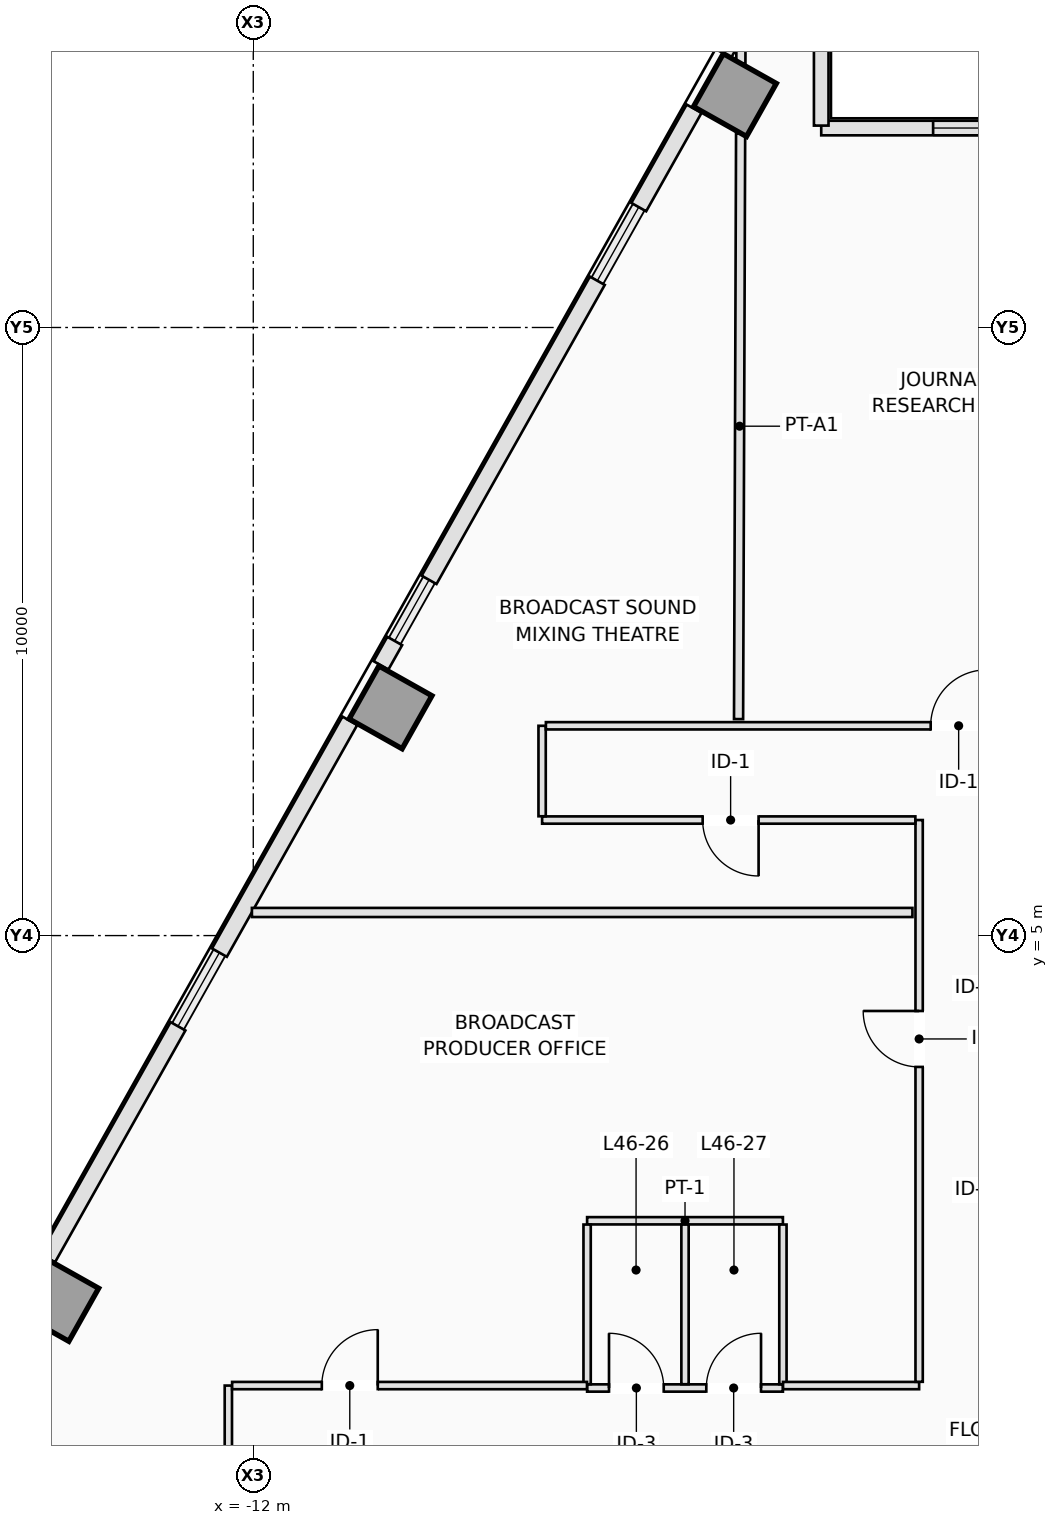
"""IFC4 building model, lengths in metres.
Left out: names, types, materials, properties, quantities, classifications, styles, units other than length and angle.
Written with IfcOpenShell. Run it as: python <this file> out.ifc"""

import sys

from ifc_helpers import new_model, si_unit, direction, frame, frame_2d, origin, origin_2d, place, context, subcontext, project, spatial, rectangle, extrude, element, fill, save


model = new_model("IFC4")
c1 = context("Model", 3, precision=1e-05, world=origin(), true_north=direction((0.0, 1.0)))
c2 = subcontext(c1, "Body", "Model", "MODEL_VIEW")
j1 = project(units=[si_unit("LENGTHUNIT", "METRE"), si_unit("PLANEANGLEUNIT", "RADIAN")], contexts=[c1])
p1 = place(None, origin())
s1 = spatial("IfcSite", under=j1, at=p1, CompositionType="ELEMENT")
p2 = place(p1, origin())
s2 = spatial("IfcBuilding", under=s1, at=p2, CompositionType="ELEMENT")
p3 = place(p2, frame((0.0, 0.0, 168.5)))
s3 = spatial("IfcBuildingStorey", under=s2, at=p3, CompositionType="ELEMENT", Elevation=168.5)
for number, where, z_axis, x_axis in (
    (1, (-4.079, 18.822, 0.0), (0.0, 0.0, 1.0), (-0.872, 0.49, 0.0)),
    (2, (-9.743, 8.753, 0.0), (0.0, 0.0, 1.0), (-0.872, 0.49, 0.0)),
    (3, (-15.224, -0.991, 0.0), (0.0, 0.0, 1.0), (-0.872, 0.49, 0.0)),
):
    element("IfcColumn", number, at=place(p3, frame(where, z_axis=z_axis, x_axis=x_axis)), inside=s3, PredefinedType="COLUMN", context=c2, shape_type="SweptSolid", body=[
        extrude(rectangle(XDim=1.0, YDim=1.0, at=origin_2d()), origin(), (0.0, 0.0, 1.0), 3.5),
    ])
p4 = place(p3, frame((-4.246, 19.495, 0.0), z_axis=(0.0, 0.0, 1.0), x_axis=(0.490048346303, 0.871695255399, 0.0)))
e4 = element("IfcWall", 4, at=p4, inside=s3, PredefinedType="STANDARD", context=c2, shape_type="SweptSolid", body=[
    extrude(rectangle(XDim=0.926, YDim=0.24, at=frame_2d((0.463, 0.0))), origin(), (0.0, 0.0, 1.0), 3.25),
])
p5 = place(p3, frame((-9.9, 9.444, 0.0), z_axis=(0.0, 0.0, 1.0), x_axis=(0.490412424957, 0.871490478116, 0.0)))
e5 = element("IfcWall", 5, at=p5, inside=s3, PredefinedType="STANDARD", context=c2, shape_type="SweptSolid", body=[
    extrude(rectangle(XDim=0.46, YDim=0.28, at=frame_2d((0.23, 0.0))), origin(), (0.0, 0.0, 1.0), 3.25),
])
p6 = place(p3, frame((-9.109, 10.85, 0.0), z_axis=(0.0, 0.0, 1.0), x_axis=(0.490289995219, 0.871559361483, 0.0)))
e6 = element("IfcWall", 6, at=p6, inside=s3, PredefinedType="STANDARD", context=c2, shape_type="SweptSolid", body=[
    extrude(rectangle(XDim=5.643, YDim=0.28, at=frame_2d((2.822, 0.0))), origin(), (0.0, 0.0, 1.0), 3.25),
])
p7 = place(p3, frame((-5.661, 16.98, 0.0), z_axis=(0.0, 0.0, 1.0), x_axis=(0.490248749158, 0.871582562899, 0.0)))
e7 = element("IfcWall", 7, at=p7, inside=s3, PredefinedType="STANDARD", context=c2, shape_type="SweptSolid", body=[
    extrude(rectangle(XDim=1.856, YDim=0.28, at=frame_2d((0.928, 0.0))), origin(), (0.0, 0.0, 1.0), 3.25),
])
p8 = place(p3, frame((-15.383, -0.305, 0.0), z_axis=(0.0, 0.0, 1.0), x_axis=(0.490232095789, 0.871591929895, 0.0)))
e8 = element("IfcWall", 8, at=p8, inside=s3, PredefinedType="STANDARD", context=c2, shape_type="SweptSolid", body=[
    extrude(rectangle(XDim=4.375, YDim=0.28, at=frame_2d((2.188, 0.0))), origin(), (0.0, 0.0, 1.0), 3.25),
])
p9 = place(p3, frame((-12.557, 4.72, 0.0), z_axis=(0.0, 0.0, 1.0), x_axis=(0.490274486291, 0.871568085747, 0.0)))
e9 = element("IfcWall", 9, at=p9, inside=s3, PredefinedType="STANDARD", context=c2, shape_type="SweptSolid", body=[
    extrude(rectangle(XDim=4.375, YDim=0.28, at=frame_2d((2.188, 0.0))), origin(), (0.0, 0.0, 1.0), 3.25),
])
p10 = place(p3, frame((2.62, 18.28, 0.0), z_axis=(0.0, 0.0, 1.0), x_axis=(-1.0, 0.0, 0.0)))
e10 = element("IfcWall", 10, at=p10, inside=s3, PredefinedType="STANDARD", context=c2, shape_type="SweptSolid", body=[
    extrude(rectangle(XDim=5.28, YDim=0.24, at=frame_2d((2.64, 0.0))), origin(), (0.0, 0.0, 1.0), 3.25),
])
p11 = place(p10, frame((1.84, 0.0, 0.9)))
e11 = element("IfcOpeningElement", 11, at=p11, cuts=e10, PredefinedType="OPENING", context=c2, shape_type="SweptSolid", body=[
    extrude(rectangle(XDim=1.6, YDim=2.1, at=frame_2d((0.8, 1.05))), frame((0.0, 0.13, 0.0), z_axis=(0.0, -1.0, 0.0), x_axis=(1.0, 0.0, 0.0)), (0.0, 0.0, 1.0), 0.26),
])
p12 = place(p3, frame((-2.66, 18.32, 0.0), z_axis=(0.0, 0.0, 1.0), x_axis=(0.0, 1.0, 0.0)))
e12 = element("IfcWall", 12, at=p12, inside=s3, PredefinedType="STANDARD", context=c2, shape_type="SweptSolid", body=[
    extrude(rectangle(XDim=1.96, YDim=0.24, at=frame_2d((0.98, 0.0))), origin(), (0.0, 0.0, 1.0), 3.25),
])
p13 = place(p3, frame((-6.51, -2.44, 0.0), z_axis=(0.0, 0.0, 1.0), x_axis=(1.0, 0.0, 0.0)))
e13 = element("IfcWall", 13, at=p13, inside=s3, PredefinedType="PARTITIONING", context=c2, shape_type="SweptSolid", body=[
    extrude(rectangle(XDim=3.22, YDim=0.12, at=frame_2d((1.61, 0.0))), origin(), (0.0, 0.0, 1.0), 2.891),
])
p14 = place(p13, frame((0.36, 0.0, 0.0)))
e14 = element("IfcOpeningElement", 14, at=p14, cuts=e13, PredefinedType="OPENING", context=c2, shape_type="SweptSolid", body=[
    extrude(rectangle(XDim=0.9, YDim=2.12, at=frame_2d((0.45, 1.06))), frame((0.0, 0.07, 0.0), z_axis=(0.0, -1.0, 0.0), x_axis=(1.0, 0.0, 0.0)), (0.0, 0.0, 1.0), 0.14),
])
p15 = place(p13, frame((1.96, 0.0, 0.0)))
e15 = element("IfcOpeningElement", 15, at=p15, cuts=e13, PredefinedType="OPENING", context=c2, shape_type="SweptSolid", body=[
    extrude(rectangle(XDim=0.9, YDim=2.12, at=frame_2d((0.45, 1.06))), frame((0.0, 0.07, 0.0), z_axis=(0.0, -1.0, 0.0), x_axis=(1.0, 0.0, 0.0)), (0.0, 0.0, 1.0), 0.14),
])
p16 = place(p3, frame((-6.51, 0.31, 0.0), z_axis=(0.0, 0.0, 1.0), x_axis=(1.0, 0.0, 0.0)))
e16 = element("IfcWall", 16, at=p16, inside=s3, PredefinedType="PARTITIONING", context=c2, shape_type="SweptSolid", body=[
    extrude(rectangle(XDim=3.22, YDim=0.12, at=frame_2d((1.61, 0.0))), origin(), (0.0, 0.0, 1.0), 3.25),
])
for number, where, z_axis, x_axis in (
    (17, (-6.51, -2.378, 0.0), (0.0, 0.0, 1.0), (0.0, 1.0, 0.0)),
    (18, (-4.9, -2.378, 0.0), (0.0, 0.0, 1.0), (0.0, 1.0, 0.0)),
    (19, (-3.29, -2.378, 0.0), (0.0, 0.0, 1.0), (0.0, 1.0, 0.0)),
):
    element("IfcWall", number, at=place(p3, frame(where, z_axis=z_axis, x_axis=x_axis)), inside=s3, PredefinedType="PARTITIONING", context=c2, shape_type="SweptSolid", body=[
        extrude(rectangle(XDim=2.626, YDim=0.12, at=frame_2d((1.313, 0.0))), origin(), (0.0, 0.0, 1.0), 3.25),
    ])
p17 = place(p3, frame((-12.41, -4.248, 0.0), z_axis=(0.0, 0.0, 1.0), x_axis=(0.0, 1.0, 0.0)))
e20 = element("IfcWall", 20, at=p17, inside=s3, PredefinedType="PARTITIONING", context=c2, shape_type="SweptSolid", body=[
    extrude(rectangle(XDim=1.848, YDim=0.12, at=frame_2d((0.924, 0.0))), origin(), (0.0, 0.0, 1.0), 3.25),
])
p18 = place(p3, frame((-12.348, -2.4, 0.0), z_axis=(0.0, 0.0, 1.0), x_axis=(1.0, 0.0, 0.0)))
e21 = element("IfcWall", 21, at=p18, inside=s3, PredefinedType="PARTITIONING", context=c2, shape_type="SweptSolid", body=[
    extrude(rectangle(XDim=5.836, YDim=0.12, at=frame_2d((2.918, 0.0))), origin(), (0.0, 0.0, 1.0), 3.25),
])
p19 = place(p18, frame((1.475, 0.0, 0.0)))
e22 = element("IfcOpeningElement", 22, at=p19, cuts=e21, PredefinedType="OPENING", context=c2, shape_type="SweptSolid", body=[
    extrude(rectangle(XDim=0.92, YDim=2.12, at=frame_2d((0.46, 1.06))), frame((0.0, 0.07, 0.0), z_axis=(0.0, -1.0, 0.0), x_axis=(1.0, 0.0, 0.0)), (0.0, 0.0, 1.0), 0.14),
])
p20 = place(p3, frame((-3.288, -2.4, 0.0), z_axis=(0.0, 0.0, 1.0), x_axis=(1.0, 0.0, 0.0)))
e23 = element("IfcWall", 23, at=p20, inside=s3, PredefinedType="PARTITIONING", context=c2, shape_type="SweptSolid", body=[
    extrude(rectangle(XDim=2.238, YDim=0.12, at=frame_2d((1.119, 0.0))), origin(), (0.0, 0.0, 1.0), 2.891),
])
p21 = place(p3, frame((-1.05, -2.338, 0.0), z_axis=(0.0, 0.0, 1.0), x_axis=(0.0, 1.0, 0.0)))
e24 = element("IfcWall", 24, at=p21, inside=s3, PredefinedType="PARTITIONING", context=c2, shape_type="SweptSolid", body=[
    extrude(rectangle(XDim=9.238, YDim=0.12, at=frame_2d((4.619, 0.0))), origin(), (0.0, 0.0, 1.0), 3.25),
])
p22 = place(p21, frame((5.178, 0.0, 0.0)))
e25 = element("IfcOpeningElement", 25, at=p22, cuts=e24, PredefinedType="OPENING", context=c2, shape_type="SweptSolid", body=[
    extrude(rectangle(XDim=0.92, YDim=2.12, at=frame_2d((0.46, 1.06))), frame((0.0, 0.07, 0.0), z_axis=(0.0, -1.0, 0.0), x_axis=(1.0, 0.0, 0.0)), (0.0, 0.0, 1.0), 0.14),
])
p23 = place(p3, frame((-1.112, 6.9, 0.0), z_axis=(0.0, 0.0, 1.0), x_axis=(-1.0, 0.0, 0.0)))
e26 = element("IfcWall", 26, at=p23, inside=s3, PredefinedType="PARTITIONING", context=c2, shape_type="SweptSolid", body=[
    extrude(rectangle(XDim=6.138, YDim=0.12, at=frame_2d((3.069, 0.0))), origin(), (0.0, 0.0, 1.0), 2.891),
])
p24 = place(p23, frame((2.578, 0.0, 0.0)))
e27 = element("IfcOpeningElement", 27, at=p24, cuts=e26, PredefinedType="OPENING", context=c2, shape_type="SweptSolid", body=[
    extrude(rectangle(XDim=0.92, YDim=2.12, at=frame_2d((0.46, 1.06))), frame((0.0, 0.07, 0.0), z_axis=(0.0, -1.0, 0.0), x_axis=(1.0, 0.0, 0.0)), (0.0, 0.0, 1.0), 0.14),
])
p25 = place(p3, frame((-7.25, 6.962, 0.0), z_axis=(0.0, 0.0, 1.0), x_axis=(0.0, 1.0, 0.0)))
e28 = element("IfcWall", 28, at=p25, inside=s3, PredefinedType="PARTITIONING", context=c2, shape_type="SweptSolid", body=[
    extrude(rectangle(XDim=1.488, YDim=0.12, at=frame_2d((0.744, 0.0))), origin(), (0.0, 0.0, 1.0), 3.25),
])
p26 = place(p3, frame((-7.188, 8.45, 0.0), z_axis=(0.0, 0.0, 1.0), x_axis=(1.0, 0.0, 0.0)))
e29 = element("IfcWall", 29, at=p26, inside=s3, PredefinedType="PARTITIONING", context=c2, shape_type="SweptSolid", body=[
    extrude(rectangle(XDim=14.438, YDim=0.12, at=frame_2d((7.219, 0.0))), origin(), (0.0, 0.0, 1.0), 3.25),
])
p27 = place(p26, frame((6.328, 0.0, 0.0)))
e30 = element("IfcOpeningElement", 30, at=p27, cuts=e29, PredefinedType="OPENING", context=c2, shape_type="SweptSolid", body=[
    extrude(rectangle(XDim=0.92, YDim=2.12, at=frame_2d((0.46, 1.06))), frame((0.0, 0.07, 0.0), z_axis=(0.0, -1.0, 0.0), x_axis=(1.0, 0.0, 0.0)), (0.0, 0.0, 1.0), 0.14),
])
p28 = place(p26, frame((12.284, 0.0, 0.0)))
e31 = element("IfcOpeningElement", 31, at=p28, cuts=e29, PredefinedType="OPENING", context=c2, shape_type="SweptSolid", body=[
    extrude(rectangle(XDim=0.92, YDim=2.12, at=frame_2d((0.46, 1.06))), frame((0.0, 0.07, 0.0), z_axis=(0.0, -1.0, 0.0), x_axis=(1.0, 0.0, 0.0)), (0.0, 0.0, 1.0), 0.14),
])
p29 = place(p3, frame((-4.019, 8.56, 0.0), z_axis=(0.0, 0.0, 1.0), x_axis=(0.003497279608, 0.999993884499, 0.0)))
e32 = element("IfcWall", 32, at=p29, inside=s3, PredefinedType="PARTITIONING", context=c2, shape_type="SweptSolid", body=[
    extrude(rectangle(XDim=9.634, YDim=0.15, at=frame_2d((4.817, 0.0))), origin(), (0.0, 0.0, 1.0), 2.717),
])
p30 = place(p3, frame((-3.982, 19.343, 0.0), z_axis=(0.0, 0.0, 1.0), x_axis=(0.003906220198, 0.999992370693, 0.0)))
e33 = element("IfcWall", 33, at=p30, inside=s3, PredefinedType="PARTITIONING", context=c2, shape_type="SweptSolid", body=[
    extrude(rectangle(XDim=0.375, YDim=0.15, at=frame_2d((0.188, 0.0))), origin(), (0.0, 0.0, 1.0), 3.25),
])
p31 = place(p3, frame((-1.16, 5.38, 0.0), z_axis=(0.0, 0.0, 1.0), x_axis=(-1.0, 0.0, 0.0)))
e34 = element("IfcWall", 34, at=p31, inside=s3, PredefinedType="PARTITIONING", context=c2, shape_type="SweptSolid", body=[
    extrude(rectangle(XDim=10.863, YDim=0.15, at=frame_2d((5.431, 0.0))), origin(), (0.0, 0.0, 1.0), 3.25),
])
p32 = place(p11, origin())
e35 = element("IfcWindow", 35, at=p32, inside=s3, PartitioningType="SINGLE_PANEL", PredefinedType="WINDOW", context=c2, shape_type="SweptSolid", body=[
    extrude(rectangle(XDim=1.6, YDim=2.1, at=frame_2d((0.8, 1.05))), frame((0.0, 0.03, 0.0), z_axis=(0.0, -1.0, 0.0), x_axis=(1.0, 0.0, 0.0)), (0.0, 0.0, 1.0), 0.06),
])
fill(e11, e35)
p33 = place(p14, origin())
e36 = element("IfcDoor", 36, at=p33, inside=s3, OperationType="SINGLE_SWING_LEFT", PredefinedType="DOOR", context=c2, shape_type="SweptSolid", body=[
    extrude(rectangle(XDim=0.9, YDim=2.12, at=frame_2d((0.45, 1.06))), frame((0.0, 0.025, 0.0), z_axis=(0.0, -1.0, 0.0), x_axis=(1.0, 0.0, 0.0)), (0.0, 0.0, 1.0), 0.05),
])
fill(e14, e36)
p34 = place(p15, origin())
e37 = element("IfcDoor", 37, at=p34, inside=s3, OperationType="SINGLE_SWING_RIGHT", PredefinedType="DOOR", context=c2, shape_type="SweptSolid", body=[
    extrude(rectangle(XDim=0.9, YDim=2.12, at=frame_2d((0.45, 1.06))), frame((0.0, 0.025, 0.0), z_axis=(0.0, -1.0, 0.0), x_axis=(1.0, 0.0, 0.0)), (0.0, 0.0, 1.0), 0.05),
])
fill(e15, e37)
p35 = place(p27, origin())
e38 = element("IfcDoor", 38, at=p35, inside=s3, OperationType="SINGLE_SWING_RIGHT", PredefinedType="DOOR", context=c2, shape_type="SweptSolid", body=[
    extrude(rectangle(XDim=0.92, YDim=2.12, at=frame_2d((0.46, 1.06))), frame((0.0, 0.025, 0.0), z_axis=(0.0, -1.0, 0.0), x_axis=(1.0, 0.0, 0.0)), (0.0, 0.0, 1.0), 0.05),
])
fill(e30, e38)
p36 = place(p24, origin())
e39 = element("IfcDoor", 39, at=p36, inside=s3, OperationType="SINGLE_SWING_LEFT", PredefinedType="DOOR", context=c2, shape_type="SweptSolid", body=[
    extrude(rectangle(XDim=0.92, YDim=2.12, at=frame_2d((0.46, 1.06))), frame((0.0, 0.025, 0.0), z_axis=(0.0, -1.0, 0.0), x_axis=(1.0, 0.0, 0.0)), (0.0, 0.0, 1.0), 0.05),
])
fill(e27, e39)
p37 = place(p22, origin())
e40 = element("IfcDoor", 40, at=p37, inside=s3, OperationType="SINGLE_SWING_RIGHT", PredefinedType="DOOR", context=c2, shape_type="SweptSolid", body=[
    extrude(rectangle(XDim=0.92, YDim=2.12, at=frame_2d((0.46, 1.06))), frame((0.0, 0.025, 0.0), z_axis=(0.0, -1.0, 0.0), x_axis=(1.0, 0.0, 0.0)), (0.0, 0.0, 1.0), 0.05),
])
fill(e25, e40)
p38 = place(p19, origin())
e41 = element("IfcDoor", 41, at=p38, inside=s3, OperationType="SINGLE_SWING_RIGHT", PredefinedType="DOOR", context=c2, shape_type="SweptSolid", body=[
    extrude(rectangle(XDim=0.92, YDim=2.12, at=frame_2d((0.46, 1.06))), frame((0.0, 0.025, 0.0), z_axis=(0.0, -1.0, 0.0), x_axis=(1.0, 0.0, 0.0)), (0.0, 0.0, 1.0), 0.05),
])
fill(e22, e41)
save(model, sys.argv[1])
